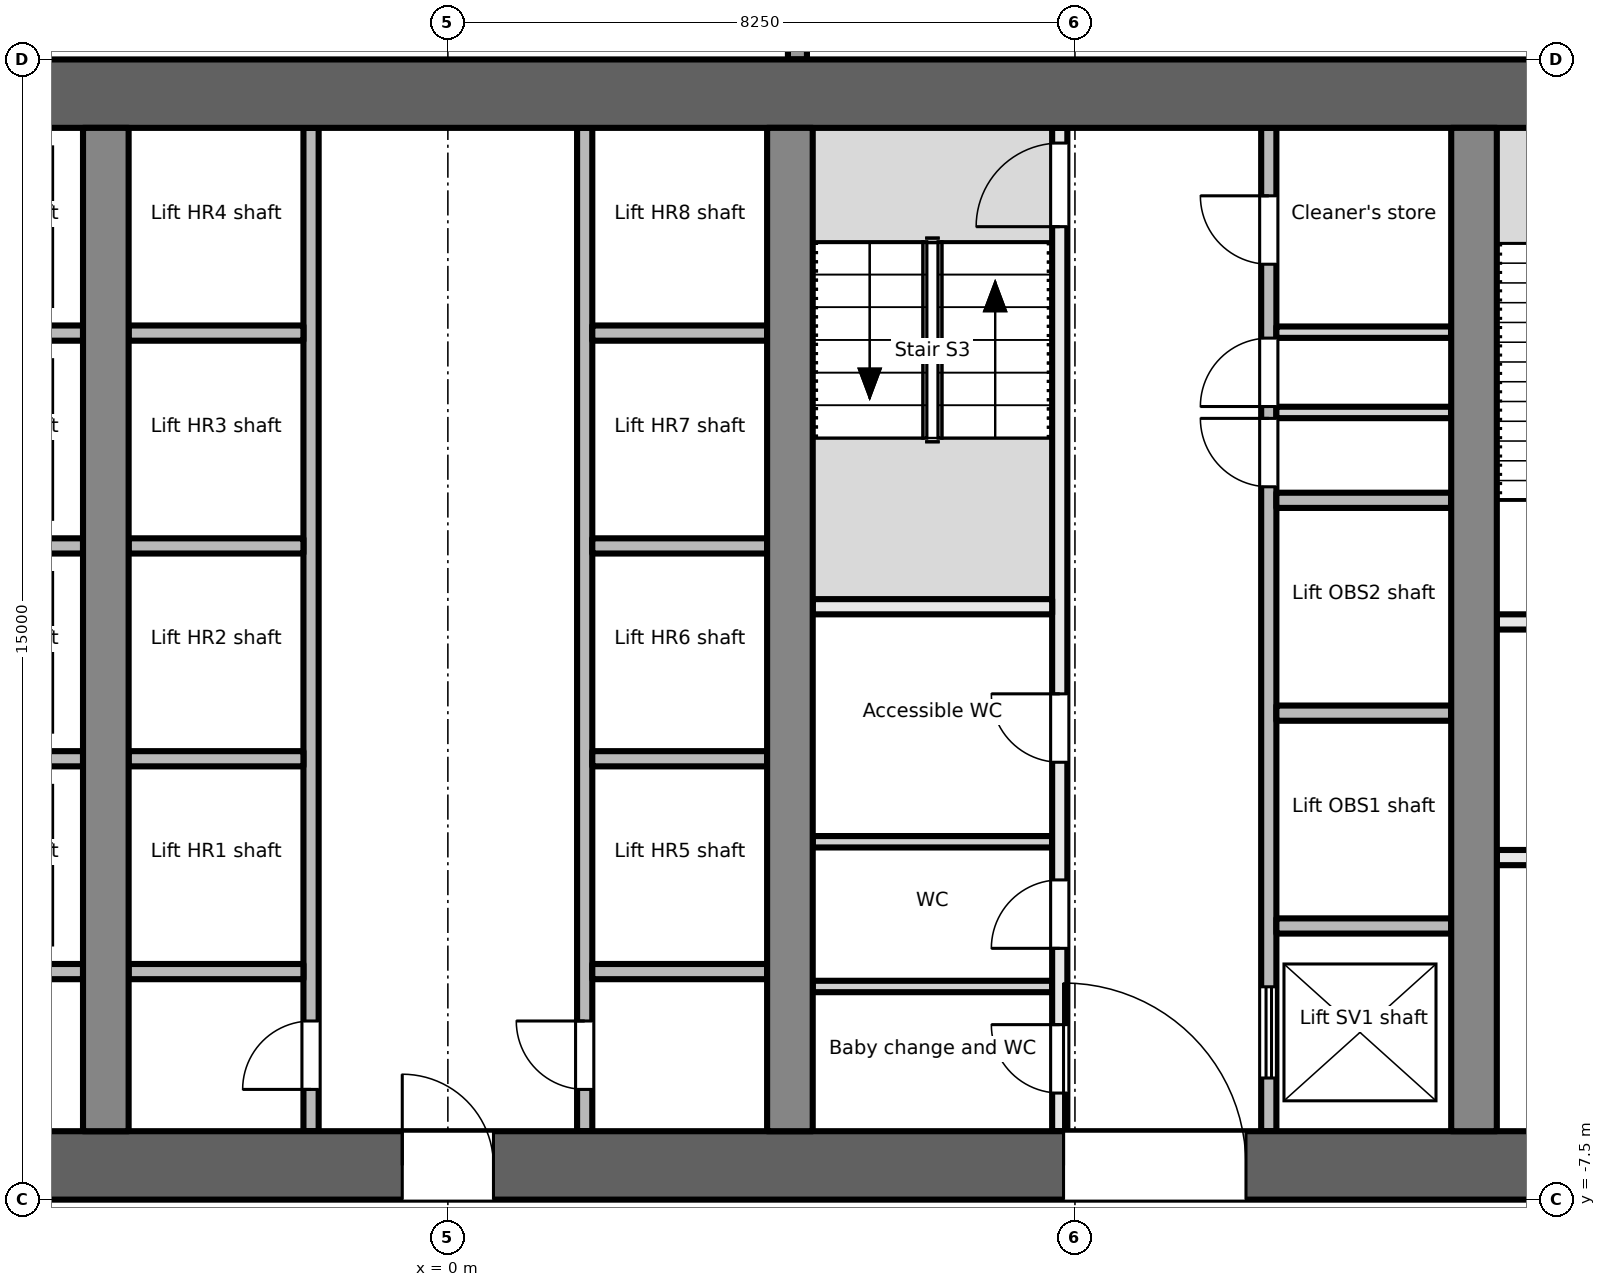
"""IFC4 building model, lengths in metres.
Left out: names, types, materials, properties, quantities, classifications, styles, units other than length and angle.
Written with IfcOpenShell. Run it as: python <this file> out.ifc"""

import sys

from ifc_helpers import new_model, si_unit, direction, frame, frame_2d, origin, place, context, subcontext, project, spatial, rectangle, extrude, element, fill, save


model = new_model("IFC4")
c1 = context("Model", 3, precision=1e-05, world=origin(), true_north=direction((0.0, 1.0)))
c2 = subcontext(c1, "Body", "Model", "MODEL_VIEW")
j1 = project(units=[si_unit("LENGTHUNIT", "METRE"), si_unit("PLANEANGLEUNIT", "RADIAN")], contexts=[c1])
p1 = place(None, origin())
s1 = spatial("IfcSite", under=j1, at=p1, CompositionType="ELEMENT")
p2 = place(p1, origin())
s2 = spatial("IfcBuilding", under=s1, at=p2, CompositionType="ELEMENT")
p3 = place(p2, frame((0.0, 0.0, 158.1)))
s3 = spatial("IfcBuildingStorey", under=s2, at=p3, CompositionType="ELEMENT", Elevation=158.1)
p4 = place(p3, frame((-18.0, -7.05, -0.2), z_axis=(0.0, 0.0, 1.0), x_axis=(1.0, 0.0, 0.0)))
e1 = element("IfcWall", 1, at=p4, inside=s3, PredefinedType="SHEAR", context=c2, shape_type="SweptSolid", body=[
    extrude(rectangle(XDim=36.0, YDim=0.9, at=frame_2d((18.0, 0.0))), origin(), (0.0, 0.0, 1.0), 5.0),
])
p5 = place(p4, frame((7.8, 0.0, 0.2)))
e2 = element("IfcOpeningElement", 2, at=p5, cuts=e1, PredefinedType="OPENING", context=c2, shape_type="SweptSolid", body=[
    extrude(rectangle(XDim=2.4, YDim=2.1, at=frame_2d((1.2, 1.05))), frame((0.0, 0.46, 0.0), z_axis=(0.0, -1.0, 0.0), x_axis=(1.0, 0.0, 0.0)), (0.0, 0.0, 1.0), 0.921),
])
p6 = place(p4, frame((17.4, 0.0, 0.2)))
e3 = element("IfcOpeningElement", 3, at=p6, cuts=e1, PredefinedType="OPENING", context=c2, shape_type="SweptSolid", body=[
    extrude(rectangle(XDim=1.2, YDim=2.1, at=frame_2d((0.6, 1.05))), frame((0.0, 0.46, 0.0), z_axis=(0.0, -1.0, 0.0), x_axis=(1.0, 0.0, 0.0)), (0.0, 0.0, 1.0), 0.921),
])
p7 = place(p4, frame((26.1, 0.0, 0.2)))
e4 = element("IfcOpeningElement", 4, at=p7, cuts=e1, PredefinedType="OPENING", context=c2, shape_type="SweptSolid", body=[
    extrude(rectangle(XDim=2.4, YDim=2.1, at=frame_2d((1.2, 1.05))), frame((0.0, 0.46, 0.0), z_axis=(0.0, -1.0, 0.0), x_axis=(1.0, 0.0, 0.0)), (0.0, 0.0, 1.0), 0.921),
])
p8 = place(p3, frame((-18.0, 7.05, -0.2), z_axis=(0.0, 0.0, 1.0), x_axis=(1.0, 0.0, 0.0)))
e5 = element("IfcWall", 5, at=p8, inside=s3, PredefinedType="SHEAR", context=c2, shape_type="SweptSolid", body=[
    extrude(rectangle(XDim=36.0, YDim=0.9, at=frame_2d((18.0, 0.0))), origin(), (0.0, 0.0, 1.0), 5.0),
])
for number, where, z_axis, x_axis in (
    (6, (-4.5, -6.6, -0.2), (0.0, 0.0, 1.0), (0.0, 1.0, 0.0)),
    (7, (4.5, -6.6, -0.2), (0.0, 0.0, 1.0), (0.0, 1.0, 0.0)),
    (8, (13.5, -6.6, -0.2), (0.0, 0.0, 1.0), (0.0, 1.0, 0.0)),
):
    element("IfcWall", number, at=place(p3, frame(where, z_axis=z_axis, x_axis=x_axis)), inside=s3, PredefinedType="SHEAR", context=c2, shape_type="SweptSolid", body=[
        extrude(rectangle(XDim=13.2, YDim=0.6, at=frame_2d((6.6, 0.0))), origin(), (0.0, 0.0, 1.0), 5.0),
    ])
p9 = place(p3, frame((13.8, -3.0, 0.0), z_axis=(0.0, 0.0, 1.0), x_axis=(1.0, 0.0, 0.0)))
e9 = element("IfcWall", 9, at=p9, inside=s3, PredefinedType="PARTITIONING", context=c2, shape_type="SweptSolid", body=[
    extrude(rectangle(XDim=3.3, YDim=0.2, at=frame_2d((1.65, 0.0))), origin(), (0.0, 0.0, 1.0), 4.8),
])
p10 = place(p9, frame((1.1, 0.0, 0.0)))
e10 = element("IfcOpeningElement", 10, at=p10, cuts=e9, PredefinedType="OPENING", context=c2, shape_type="SweptSolid", body=[
    extrude(rectangle(XDim=1.1, YDim=2.1, at=frame_2d((0.55, 1.05))), frame((0.0, 0.111, 0.0), z_axis=(0.0, -1.0, 0.0), x_axis=(1.0, 0.0, 0.0)), (0.0, 0.0, 1.0), 0.221),
])
p11 = place(p3, frame((13.8, 0.1, 0.0), z_axis=(0.0, 0.0, 1.0), x_axis=(1.0, 0.0, 0.0)))
e11 = element("IfcWall", 11, at=p11, inside=s3, PredefinedType="PARTITIONING", context=c2, shape_type="SweptSolid", body=[
    extrude(rectangle(XDim=3.3, YDim=0.2, at=frame_2d((1.65, 0.0))), origin(), (0.0, 0.0, 1.0), 4.8),
])
p12 = place(p11, frame((1.1, 0.0, 0.0)))
e12 = element("IfcOpeningElement", 12, at=p12, cuts=e11, PredefinedType="OPENING", context=c2, shape_type="SweptSolid", body=[
    extrude(rectangle(XDim=1.1, YDim=2.1, at=frame_2d((0.55, 1.05))), frame((0.0, 0.111, 0.0), z_axis=(0.0, -1.0, 0.0), x_axis=(1.0, 0.0, 0.0)), (0.0, 0.0, 1.0), 0.221),
])
for number, where, z_axis, x_axis in (
    (13, (-7.1, -1.7, 0.0), (0.0, 0.0, 1.0), (1.0, 0.0, 0.0)),
    (14, (-7.1, 1.1, 0.0), (0.0, 0.0, 1.0), (1.0, 0.0, 0.0)),
    (15, (-7.1, 3.9, 0.0), (0.0, 0.0, 1.0), (1.0, 0.0, 0.0)),
    (16, (-7.1, -4.5, 0.0), (0.0, 0.0, 1.0), (1.0, 0.0, 0.0)),
):
    element("IfcWall", number, at=place(p3, frame(where, z_axis=z_axis, x_axis=x_axis)), inside=s3, PredefinedType="PARTITIONING", context=c2, shape_type="SweptSolid", body=[
        extrude(rectangle(XDim=2.3, YDim=0.2, at=frame_2d((1.15, 0.0))), origin(), (0.0, 0.0, 1.0), 4.8),
    ])
p13 = place(p3, frame((-1.8, -6.6, 0.0), z_axis=(0.0, 0.0, 1.0), x_axis=(0.0, 1.0, 0.0)))
e17 = element("IfcWall", 17, at=p13, inside=s3, PredefinedType="PARTITIONING", context=c2, shape_type="SweptSolid", body=[
    extrude(rectangle(XDim=13.2, YDim=0.2, at=frame_2d((6.6, 0.0))), origin(), (0.0, 0.0, 1.0), 4.8),
])
p14 = place(p13, frame((0.55, 0.0, 0.0)))
e18 = element("IfcOpeningElement", 18, at=p14, cuts=e17, PredefinedType="OPENING", context=c2, shape_type="SweptSolid", body=[
    extrude(rectangle(XDim=0.9, YDim=2.1, at=frame_2d((0.45, 1.05))), frame((0.0, 0.111, 0.0), z_axis=(0.0, -1.0, 0.0), x_axis=(1.0, 0.0, 0.0)), (0.0, 0.0, 1.0), 0.221),
])
p15 = place(p3, frame((1.8, -6.6, 0.0), z_axis=(0.0, 0.0, 1.0), x_axis=(0.0, 1.0, 0.0)))
e19 = element("IfcWall", 19, at=p15, inside=s3, PredefinedType="PARTITIONING", context=c2, shape_type="SweptSolid", body=[
    extrude(rectangle(XDim=13.2, YDim=0.2, at=frame_2d((6.6, 0.0))), origin(), (0.0, 0.0, 1.0), 4.8),
])
p16 = place(p15, frame((0.55, 0.0, 0.0)))
e20 = element("IfcOpeningElement", 20, at=p16, cuts=e19, PredefinedType="OPENING", context=c2, shape_type="SweptSolid", body=[
    extrude(rectangle(XDim=0.9, YDim=2.1, at=frame_2d((0.45, 1.05))), frame((0.0, 0.111, 0.0), z_axis=(0.0, -1.0, 0.0), x_axis=(1.0, 0.0, 0.0)), (0.0, 0.0, 1.0), 0.221),
])
for number, where, z_axis, x_axis in (
    (21, (-4.2, -1.7, 0.0), (0.0, 0.0, 1.0), (1.0, 0.0, 0.0)),
    (22, (-4.2, 1.1, 0.0), (0.0, 0.0, 1.0), (1.0, 0.0, 0.0)),
    (23, (-4.2, 3.9, 0.0), (0.0, 0.0, 1.0), (1.0, 0.0, 0.0)),
    (24, (-4.2, -4.5, 0.0), (0.0, 0.0, 1.0), (1.0, 0.0, 0.0)),
    (25, (1.9, -1.7, 0.0), (0.0, 0.0, 1.0), (1.0, 0.0, 0.0)),
    (26, (1.9, 1.1, 0.0), (0.0, 0.0, 1.0), (1.0, 0.0, 0.0)),
    (27, (1.9, 3.9, 0.0), (0.0, 0.0, 1.0), (1.0, 0.0, 0.0)),
    (28, (1.9, -4.5, 0.0), (0.0, 0.0, 1.0), (1.0, 0.0, 0.0)),
):
    element("IfcWall", number, at=place(p3, frame(where, z_axis=z_axis, x_axis=x_axis)), inside=s3, PredefinedType="PARTITIONING", context=c2, shape_type="SweptSolid", body=[
        extrude(rectangle(XDim=2.3, YDim=0.2, at=frame_2d((1.15, 0.0))), origin(), (0.0, 0.0, 1.0), 4.8),
    ])
p17 = place(p3, frame((8.05, -6.6, 0.0), z_axis=(0.0, 0.0, 1.0), x_axis=(0.0, 1.0, 0.0)))
e29 = element("IfcWall", 29, at=p17, inside=s3, PredefinedType="PARTITIONING", context=c2, shape_type="SweptSolid", body=[
    extrude(rectangle(XDim=13.2, YDim=0.2, at=frame_2d((6.6, 0.0))), origin(), (0.0, 0.0, 1.0), 4.8),
])
p18 = place(p17, frame((0.502, 0.0, 0.0)))
e30 = element("IfcOpeningElement", 30, at=p18, cuts=e29, PredefinedType="OPENING", context=c2, shape_type="SweptSolid", body=[
    extrude(rectangle(XDim=0.9, YDim=2.1, at=frame_2d((0.45, 1.05))), frame((0.0, 0.111, 0.0), z_axis=(0.0, -1.0, 0.0), x_axis=(1.0, 0.0, 0.0)), (0.0, 0.0, 1.0), 0.221),
])
p19 = place(p17, frame((2.406, 0.0, 0.0)))
e31 = element("IfcOpeningElement", 31, at=p19, cuts=e29, PredefinedType="OPENING", context=c2, shape_type="SweptSolid", body=[
    extrude(rectangle(XDim=0.9, YDim=2.1, at=frame_2d((0.45, 1.05))), frame((0.0, 0.111, 0.0), z_axis=(0.0, -1.0, 0.0), x_axis=(1.0, 0.0, 0.0)), (0.0, 0.0, 1.0), 0.221),
])
p20 = place(p17, frame((4.854, 0.0, 0.0)))
e32 = element("IfcOpeningElement", 32, at=p20, cuts=e29, PredefinedType="OPENING", context=c2, shape_type="SweptSolid", body=[
    extrude(rectangle(XDim=0.9, YDim=2.1, at=frame_2d((0.45, 1.05))), frame((0.0, 0.111, 0.0), z_axis=(0.0, -1.0, 0.0), x_axis=(1.0, 0.0, 0.0)), (0.0, 0.0, 1.0), 0.221),
])
p21 = place(p17, frame((11.9, 0.0, 0.0)))
e33 = element("IfcOpeningElement", 33, at=p21, cuts=e29, PredefinedType="OPENING", context=c2, shape_type="SweptSolid", body=[
    extrude(rectangle(XDim=1.1, YDim=2.1, at=frame_2d((0.55, 1.05))), frame((0.0, 0.111, 0.0), z_axis=(0.0, -1.0, 0.0), x_axis=(1.0, 0.0, 0.0)), (0.0, 0.0, 1.0), 0.221),
])
p22 = place(p3, frame((10.8, -6.6, 0.0), z_axis=(0.0, 0.0, 1.0), x_axis=(0.0, 1.0, 0.0)))
e34 = element("IfcWall", 34, at=p22, inside=s3, PredefinedType="PARTITIONING", context=c2, shape_type="SweptSolid", body=[
    extrude(rectangle(XDim=13.2, YDim=0.2, at=frame_2d((6.6, 0.0))), origin(), (0.0, 0.0, 1.0), 4.8),
])
p23 = place(p22, frame((0.7, 0.0, 0.0)))
e35 = element("IfcOpeningElement", 35, at=p23, cuts=e34, PredefinedType="OPENING", context=c2, shape_type="SweptSolid", body=[
    extrude(rectangle(XDim=1.2, YDim=2.1, at=frame_2d((0.6, 1.05))), frame((0.0, 0.111, 0.0), z_axis=(0.0, -1.0, 0.0), x_axis=(1.0, 0.0, 0.0)), (0.0, 0.0, 1.0), 0.221),
])
p24 = place(p22, frame((8.478, 0.0, 0.0)))
e36 = element("IfcOpeningElement", 36, at=p24, cuts=e34, PredefinedType="OPENING", context=c2, shape_type="SweptSolid", body=[
    extrude(rectangle(XDim=0.9, YDim=2.1, at=frame_2d((0.45, 1.05))), frame((0.0, 0.111, 0.0), z_axis=(0.0, -1.0, 0.0), x_axis=(1.0, 0.0, 0.0)), (0.0, 0.0, 1.0), 0.221),
])
p25 = place(p22, frame((9.534, 0.0, 0.0)))
e37 = element("IfcOpeningElement", 37, at=p25, cuts=e34, PredefinedType="OPENING", context=c2, shape_type="SweptSolid", body=[
    extrude(rectangle(XDim=0.9, YDim=2.1, at=frame_2d((0.45, 1.05))), frame((0.0, 0.111, 0.0), z_axis=(0.0, -1.0, 0.0), x_axis=(1.0, 0.0, 0.0)), (0.0, 0.0, 1.0), 0.221),
])
p26 = place(p22, frame((11.406, 0.0, 0.0)))
e38 = element("IfcOpeningElement", 38, at=p26, cuts=e34, PredefinedType="OPENING", context=c2, shape_type="SweptSolid", body=[
    extrude(rectangle(XDim=0.9, YDim=2.1, at=frame_2d((0.45, 1.05))), frame((0.0, 0.111, 0.0), z_axis=(0.0, -1.0, 0.0), x_axis=(1.0, 0.0, 0.0)), (0.0, 0.0, 1.0), 0.221),
])
p27 = place(p3, frame((4.8, 0.3, 0.0), z_axis=(0.0, 0.0, 1.0), x_axis=(1.0, 0.0, 0.0)))
e39 = element("IfcWall", 39, at=p27, inside=s3, PredefinedType="PARTITIONING", context=c2, shape_type="SweptSolid", body=[
    extrude(rectangle(XDim=3.15, YDim=0.2, at=frame_2d((1.575, 0.0))), origin(), (0.0, 0.0, 1.0), 4.8),
])
for number, where, z_axis, x_axis in (
    (40, (4.8, -4.696, 0.0), (0.0, 0.0, 1.0), (1.0, 0.0, 0.0)),
    (41, (4.8, -2.792, 0.0), (0.0, 0.0, 1.0), (1.0, 0.0, 0.0)),
):
    element("IfcWall", number, at=place(p3, frame(where, z_axis=z_axis, x_axis=x_axis)), inside=s3, PredefinedType="PARTITIONING", context=c2, shape_type="SweptSolid", body=[
        extrude(rectangle(XDim=3.15, YDim=0.15, at=frame_2d((1.575, 0.0))), origin(), (0.0, 0.0, 1.0), 4.8),
    ])
for number, where, z_axis, x_axis in (
    (42, (10.9, -3.9, 0.0), (0.0, 0.0, 1.0), (1.0, 0.0, 0.0)),
    (43, (10.9, -1.1, 0.0), (0.0, 0.0, 1.0), (1.0, 0.0, 0.0)),
    (44, (10.9, 1.7, 0.0), (0.0, 0.0, 1.0), (1.0, 0.0, 0.0)),
):
    element("IfcWall", number, at=place(p3, frame(where, z_axis=z_axis, x_axis=x_axis)), inside=s3, PredefinedType="PARTITIONING", context=c2, shape_type="SweptSolid", body=[
        extrude(rectangle(XDim=2.3, YDim=0.2, at=frame_2d((1.15, 0.0))), origin(), (0.0, 0.0, 1.0), 4.8),
    ])
for number, where, z_axis, x_axis in (
    (45, (10.9, 2.856, 0.0), (0.0, 0.0, 1.0), (1.0, 0.0, 0.0)),
    (46, (10.9, 3.912, 0.0), (0.0, 0.0, 1.0), (1.0, 0.0, 0.0)),
):
    element("IfcWall", number, at=place(p3, frame(where, z_axis=z_axis, x_axis=x_axis)), inside=s3, PredefinedType="PARTITIONING", context=c2, shape_type="SweptSolid", body=[
        extrude(rectangle(XDim=2.3, YDim=0.15, at=frame_2d((1.15, 0.0))), origin(), (0.0, 0.0, 1.0), 4.8),
    ])
p28 = place(p3, frame((4.599, 10.514, 0.0), z_axis=(0.0, 0.0, 1.0), x_axis=(0.0, -1.0, 0.0)))
e47 = element("IfcWall", 47, at=p28, inside=s3, PredefinedType="PARTITIONING", context=c2, shape_type="SweptSolid", body=[
    extrude(rectangle(XDim=3.014, YDim=0.25, at=frame_2d((1.507, 0.0))), origin(), (0.0, 0.0, 1.0), 4.5),
])
p29 = place(p14, origin())
e48 = element("IfcDoor", 48, at=p29, inside=s3, OperationType="SINGLE_SWING_LEFT", PredefinedType="DOOR", context=c2, shape_type="SweptSolid", body=[
    extrude(rectangle(XDim=0.9, YDim=2.1, at=frame_2d((0.45, 1.05))), frame((0.0, 0.025, 0.0), z_axis=(0.0, -1.0, 0.0), x_axis=(1.0, 0.0, 0.0)), (0.0, 0.0, 1.0), 0.05),
])
fill(e18, e48)
p30 = place(p16, origin())
e49 = element("IfcDoor", 49, at=p30, inside=s3, OperationType="SINGLE_SWING_RIGHT", PredefinedType="DOOR", context=c2, shape_type="SweptSolid", body=[
    extrude(rectangle(XDim=0.9, YDim=2.1, at=frame_2d((0.45, 1.05))), frame((0.0, 0.025, 0.0), z_axis=(0.0, -1.0, 0.0), x_axis=(1.0, 0.0, 0.0)), (0.0, 0.0, 1.0), 0.05),
])
fill(e20, e49)
p31 = place(p6, origin())
e50 = element("IfcDoor", 50, at=p31, inside=s3, OperationType="SINGLE_SWING_LEFT", PredefinedType="DOOR", context=c2, shape_type="SweptSolid", body=[
    extrude(rectangle(XDim=1.2, YDim=2.1, at=frame_2d((0.6, 1.05))), frame((0.0, 0.025, 0.0), z_axis=(0.0, -1.0, 0.0), x_axis=(1.0, 0.0, 0.0)), (0.0, 0.0, 1.0), 0.05),
])
fill(e3, e50)
p32 = place(p18, origin())
e51 = element("IfcDoor", 51, at=p32, inside=s3, OperationType="SINGLE_SWING_RIGHT", PredefinedType="DOOR", context=c2, shape_type="SweptSolid", body=[
    extrude(rectangle(XDim=0.9, YDim=2.1, at=frame_2d((0.45, 1.05))), frame((0.0, 0.025, 0.0), z_axis=(0.0, -1.0, 0.0), x_axis=(1.0, 0.0, 0.0)), (0.0, 0.0, 1.0), 0.05),
])
fill(e30, e51)
p33 = place(p19, origin())
e52 = element("IfcDoor", 52, at=p33, inside=s3, OperationType="SINGLE_SWING_LEFT", PredefinedType="DOOR", context=c2, shape_type="SweptSolid", body=[
    extrude(rectangle(XDim=0.9, YDim=2.1, at=frame_2d((0.45, 1.05))), frame((0.0, 0.025, 0.0), z_axis=(0.0, -1.0, 0.0), x_axis=(1.0, 0.0, 0.0)), (0.0, 0.0, 1.0), 0.05),
])
fill(e31, e52)
p34 = place(p20, origin())
e53 = element("IfcDoor", 53, at=p34, inside=s3, OperationType="SINGLE_SWING_RIGHT", PredefinedType="DOOR", context=c2, shape_type="SweptSolid", body=[
    extrude(rectangle(XDim=0.9, YDim=2.1, at=frame_2d((0.45, 1.05))), frame((0.0, 0.025, 0.0), z_axis=(0.0, -1.0, 0.0), x_axis=(1.0, 0.0, 0.0)), (0.0, 0.0, 1.0), 0.05),
])
fill(e32, e53)
p35 = place(p21, origin())
e54 = element("IfcDoor", 54, at=p35, inside=s3, OperationType="SINGLE_SWING_LEFT", PredefinedType="DOOR", context=c2, shape_type="SweptSolid", body=[
    extrude(rectangle(XDim=1.1, YDim=2.1, at=frame_2d((0.55, 1.05))), frame((0.0, 0.025, 0.0), z_axis=(0.0, -1.0, 0.0), x_axis=(1.0, 0.0, 0.0)), (0.0, 0.0, 1.0), 0.05),
])
fill(e33, e54)
p36 = place(p7, origin())
e55 = element("IfcDoor", 55, at=p36, inside=s3, OperationType="DOUBLE_DOOR_DOUBLE_SWING", PredefinedType="DOOR", context=c2, shape_type="SweptSolid", body=[
    extrude(rectangle(XDim=2.4, YDim=2.1, at=frame_2d((1.2, 1.05))), frame((0.0, 0.025, 0.0), z_axis=(0.0, -1.0, 0.0), x_axis=(1.0, 0.0, 0.0)), (0.0, 0.0, 1.0), 0.05),
])
fill(e4, e55)
p37 = place(p23, origin())
e56 = element("IfcDoor", 56, at=p37, inside=s3, OperationType="DOUBLE_DOOR_SLIDING", PredefinedType="DOOR", context=c2, shape_type="SweptSolid", body=[
    extrude(rectangle(XDim=1.2, YDim=2.1, at=frame_2d((0.6, 1.05))), frame((0.0, 0.025, 0.0), z_axis=(0.0, -1.0, 0.0), x_axis=(1.0, 0.0, 0.0)), (0.0, 0.0, 1.0), 0.05),
])
fill(e35, e56)
p38 = place(p24, origin())
e57 = element("IfcDoor", 57, at=p38, inside=s3, OperationType="SINGLE_SWING_RIGHT", PredefinedType="DOOR", context=c2, shape_type="SweptSolid", body=[
    extrude(rectangle(XDim=0.9, YDim=2.1, at=frame_2d((0.45, 1.05))), frame((0.0, 0.025, 0.0), z_axis=(0.0, -1.0, 0.0), x_axis=(1.0, 0.0, 0.0)), (0.0, 0.0, 1.0), 0.05),
])
fill(e36, e57)
p39 = place(p25, origin())
e58 = element("IfcDoor", 58, at=p39, inside=s3, OperationType="SINGLE_SWING_LEFT", PredefinedType="DOOR", context=c2, shape_type="SweptSolid", body=[
    extrude(rectangle(XDim=0.9, YDim=2.1, at=frame_2d((0.45, 1.05))), frame((0.0, 0.025, 0.0), z_axis=(0.0, -1.0, 0.0), x_axis=(1.0, 0.0, 0.0)), (0.0, 0.0, 1.0), 0.05),
])
fill(e37, e58)
p40 = place(p26, origin())
e59 = element("IfcDoor", 59, at=p40, inside=s3, OperationType="SINGLE_SWING_RIGHT", PredefinedType="DOOR", context=c2, shape_type="SweptSolid", body=[
    extrude(rectangle(XDim=0.9, YDim=2.1, at=frame_2d((0.45, 1.05))), frame((0.0, 0.025, 0.0), z_axis=(0.0, -1.0, 0.0), x_axis=(1.0, 0.0, 0.0)), (0.0, 0.0, 1.0), 0.05),
])
fill(e38, e59)
save(model, sys.argv[1])
